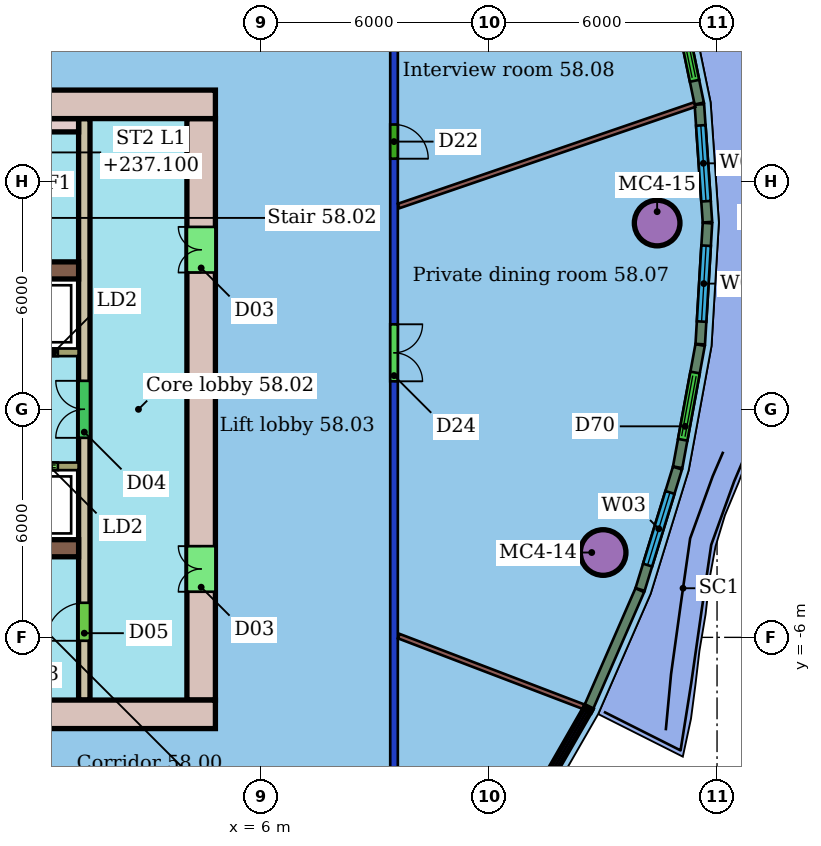
"""IFC4 building model, lengths in metres.
Left out: names, types, materials, properties, quantities, classifications, styles, units other than length and angle.
Written with IfcOpenShell. Run it as: python <this file> out.ifc"""

import sys

from ifc_helpers import new_model, si_unit, direction, frame, frame_2d, origin, origin_2d, place, context, subcontext, project, spatial, rectangle, hollow_circle, extrude, element, fill, save


model = new_model("IFC4")
c1 = context("Model", 3, precision=1e-05, world=origin(), true_north=direction((0.0, 1.0)))
c2 = subcontext(c1, "Body", "Model", "MODEL_VIEW")
j1 = project(units=[si_unit("LENGTHUNIT", "METRE"), si_unit("PLANEANGLEUNIT", "RADIAN")], contexts=[c1])
p1 = place(None, origin())
s1 = spatial("IfcSite", under=j1, at=p1, CompositionType="ELEMENT")
p2 = place(p1, origin())
s2 = spatial("IfcBuilding", under=s1, at=p2, CompositionType="ELEMENT")
p3 = place(p2, frame((0.0, 0.0, 235.3)))
s3 = spatial("IfcBuildingStorey", under=s2, at=p3, CompositionType="ELEMENT", Elevation=235.3)
for number, where, z_axis, x_axis in (
    (1, (15.003, -3.768, 0.0), (0.0, 0.0, 1.0), (1.0, 0.0, 0.0)),
    (2, (16.424, 4.901, 0.0), (0.0, 0.0, 1.0), (1.0, 0.0, 0.0)),
):
    element("IfcColumn", number, at=place(p3, frame(where, z_axis=z_axis, x_axis=x_axis)), inside=s3, PredefinedType="COLUMN", context=c2, shape_type="SweptSolid", body=[
        extrude(hollow_circle(Radius=0.6, WallThickness=0.045, at=origin_2d()), origin(), (0.0, 0.0, 1.0), 3.45),
    ])
p4 = place(p3, frame((9.5, 10.4, 0.0), z_axis=(0.0, 0.0, 1.0), x_axis=(0.0, -1.0, 0.0)))
e3 = element("IfcWall", 3, at=p4, inside=s3, PredefinedType="PARTITIONING", context=c2, shape_type="SweptSolid", body=[
    extrude(rectangle(XDim=20.8, YDim=0.2, at=frame_2d((10.4, 0.0))), origin(), (0.0, 0.0, 1.0), 3.05),
])
p5 = place(p4, frame((8.162, 0.0, 0.0)))
e4 = element("IfcOpeningElement", 4, at=p5, cuts=e3, PredefinedType="OPENING", context=c2, shape_type="SweptSolid", body=[
    extrude(rectangle(XDim=1.5, YDim=2.1, at=frame_2d((0.75, 1.05))), frame((0.0, 0.11, 0.0), z_axis=(0.0, -1.0, 0.0), x_axis=(1.0, 0.0, 0.0)), (0.0, 0.0, 1.0), 0.22),
])
p6 = place(p4, frame((2.906, 0.0, 0.0)))
e5 = element("IfcOpeningElement", 5, at=p6, cuts=e3, PredefinedType="OPENING", context=c2, shape_type="SweptSolid", body=[
    extrude(rectangle(XDim=0.9, YDim=2.1, at=frame_2d((0.45, 1.05))), frame((0.0, 0.11, 0.0), z_axis=(0.0, -1.0, 0.0), x_axis=(1.0, 0.0, 0.0)), (0.0, 0.0, 1.0), 0.22),
])
p7 = place(p3, frame((14.493, -7.826, 0.0), z_axis=(0.0, 0.0, 1.0), x_axis=(-0.934185469715, 0.356787763485, 0.0)))
e6 = element("IfcWall", 6, at=p7, inside=s3, PredefinedType="PARTITIONING", context=c2, shape_type="SweptSolid", body=[
    extrude(rectangle(XDim=5.213, YDim=0.125, at=frame_2d((2.607, 0.0))), origin(), (0.0, 0.0, 1.0), 3.45),
])
p8 = place(p3, frame((17.41, 8.018, 0.0), z_axis=(0.0, 0.0, 1.0), x_axis=(-0.94604778294, -0.32402714762, 0.0)))
e7 = element("IfcWall", 7, at=p8, inside=s3, PredefinedType="PARTITIONING", context=c2, shape_type="SweptSolid", body=[
    extrude(rectangle(XDim=8.234, YDim=0.125, at=frame_2d((4.117, 0.0))), origin(), (0.0, 0.0, 1.0), 3.45),
])
p9 = place(p3, frame((14.626, -7.832, 0.0), z_axis=(0.0, 0.0, 1.0), x_axis=(0.399940006996, 0.916541319747, 0.0)))
e8 = element("IfcWall", 8, at=p9, inside=s3, PredefinedType="SOLIDWALL", context=c2, shape_type="SweptSolid", body=[
    extrude(rectangle(XDim=3.353, YDim=0.25, at=frame_2d((1.676, 0.0))), origin(), (0.0, 0.0, 1.0), 3.1),
])
p10 = place(p3, frame((15.975, -4.739, 0.0), z_axis=(0.0, 0.0, 1.0), x_axis=(0.294306671234, 0.955711035443, 0.0)))
e9 = element("IfcWall", 9, at=p10, inside=s3, PredefinedType="SOLIDWALL", context=c2, shape_type="SweptSolid", body=[
    extrude(rectangle(XDim=3.341, YDim=0.25, at=frame_2d((1.67, 0.0))), origin(), (0.0, 0.0, 1.0), 3.1),
])
p11 = place(p10, frame((0.67, 0.0, 0.9)))
e10 = element("IfcOpeningElement", 10, at=p11, cuts=e9, PredefinedType="OPENING", context=c2, shape_type="SweptSolid", body=[
    extrude(rectangle(XDim=2.0, YDim=2.1, at=frame_2d((1.0, 1.05))), frame((0.0, 0.135, 0.0), z_axis=(0.0, -1.0, 0.0), x_axis=(1.0, 0.0, 0.0)), (0.0, 0.0, 1.0), 0.27),
])
p12 = place(p3, frame((16.964, -1.524, 0.0), z_axis=(0.0, 0.0, 1.0), x_axis=(0.180803315383, 0.983519273399, 0.0)))
e11 = element("IfcWall", 11, at=p12, inside=s3, PredefinedType="SOLIDWALL", context=c2, shape_type="SweptSolid", body=[
    extrude(rectangle(XDim=3.271, YDim=0.25, at=frame_2d((1.635, 0.0))), origin(), (0.0, 0.0, 1.0), 3.1),
])
p13 = place(p12, frame((0.735, 0.0, 0.0)))
e12 = element("IfcOpeningElement", 12, at=p13, cuts=e11, PredefinedType="OPENING", context=c2, shape_type="SweptSolid", body=[
    extrude(rectangle(XDim=1.8, YDim=2.4, at=frame_2d((0.9, 1.2))), frame((0.0, 0.135, 0.0), z_axis=(0.0, -1.0, 0.0), x_axis=(1.0, 0.0, 0.0)), (0.0, 0.0, 1.0), 0.27),
])
p14 = place(p3, frame((17.558, 1.716, 0.0), z_axis=(0.0, 0.0, 1.0), x_axis=(0.059610174745, 0.998221732416, 0.0)))
e13 = element("IfcWall", 13, at=p14, inside=s3, PredefinedType="SOLIDWALL", context=c2, shape_type="SweptSolid", body=[
    extrude(rectangle(XDim=3.19, YDim=0.25, at=frame_2d((1.595, 0.0))), origin(), (0.0, 0.0, 1.0), 3.1),
])
p15 = place(p14, frame((0.595, 0.0, 0.9)))
e14 = element("IfcOpeningElement", 14, at=p15, cuts=e13, PredefinedType="OPENING", context=c2, shape_type="SweptSolid", body=[
    extrude(rectangle(XDim=2.0, YDim=2.1, at=frame_2d((1.0, 1.05))), frame((0.0, 0.135, 0.0), z_axis=(0.0, -1.0, 0.0), x_axis=(1.0, 0.0, 0.0)), (0.0, 0.0, 1.0), 0.27),
])
p16 = place(p3, frame((17.748, 4.924, 0.0), z_axis=(0.0, 0.0, 1.0), x_axis=(-0.068637495047, 0.997641666268, 0.0)))
e15 = element("IfcWall", 15, at=p16, inside=s3, PredefinedType="SOLIDWALL", context=c2, shape_type="SweptSolid", body=[
    extrude(rectangle(XDim=3.105, YDim=0.25, at=frame_2d((1.553, 0.0))), origin(), (0.0, 0.0, 1.0), 3.1),
])
p17 = place(p16, frame((0.553, 0.0, 0.9)))
e16 = element("IfcOpeningElement", 16, at=p17, cuts=e15, PredefinedType="OPENING", context=c2, shape_type="SweptSolid", body=[
    extrude(rectangle(XDim=2.0, YDim=2.1, at=frame_2d((1.0, 1.05))), frame((0.0, 0.135, 0.0), z_axis=(0.0, -1.0, 0.0), x_axis=(1.0, 0.0, 0.0)), (0.0, 0.0, 1.0), 0.27),
])
p18 = place(p3, frame((17.531, 8.047, 0.0), z_axis=(0.0, 0.0, 1.0), x_axis=(-0.202546805283, 0.979272582925, 0.0)))
e17 = element("IfcWall", 17, at=p18, inside=s3, PredefinedType="SOLIDWALL", context=c2, shape_type="SweptSolid", body=[
    extrude(rectangle(XDim=3.021, YDim=0.25, at=frame_2d((1.51, 0.0))), origin(), (0.0, 0.0, 1.0), 3.1),
])
p19 = place(p18, frame((0.61, 0.0, 0.0)))
e18 = element("IfcOpeningElement", 18, at=p19, cuts=e17, PredefinedType="OPENING", context=c2, shape_type="SweptSolid", body=[
    extrude(rectangle(XDim=1.8, YDim=2.4, at=frame_2d((0.9, 1.2))), frame((0.0, 0.135, 0.0), z_axis=(0.0, -1.0, 0.0), x_axis=(1.0, 0.0, 0.0)), (0.0, 0.0, 1.0), 0.27),
])
p20 = place(p3, frame((4.8, 8.025, 0.0), z_axis=(0.0, 0.0, 1.0), x_axis=(-1.0, 0.0, 0.0)))
e19 = element("IfcWall", 19, at=p20, inside=s3, PredefinedType="SHEAR", context=c2, shape_type="SweptSolid", body=[
    extrude(rectangle(XDim=10.8, YDim=0.75, at=frame_2d((5.4, 0.0))), origin(), (0.0, 0.0, 1.0), 3.3),
])
p21 = place(p20, frame((4.4, 0.0, 0.0)))
e20 = element("IfcOpeningElement", 20, at=p21, cuts=e19, PredefinedType="OPENING", context=c2, shape_type="SweptSolid", body=[
    extrude(rectangle(XDim=1.2, YDim=2.1, at=frame_2d((0.6, 1.05))), frame((0.0, 0.385, 0.0), z_axis=(0.0, -1.0, 0.0), x_axis=(1.0, 0.0, 0.0)), (0.0, 0.0, 1.0), 0.77),
])
p22 = place(p3, frame((-16.8, -8.025, 0.0), z_axis=(0.0, 0.0, 1.0), x_axis=(1.0, 0.0, 0.0)))
e21 = element("IfcWall", 21, at=p22, inside=s3, PredefinedType="SHEAR", context=c2, shape_type="SweptSolid", body=[
    extrude(rectangle(XDim=21.6, YDim=0.75, at=frame_2d((10.8, 0.0))), origin(), (0.0, 0.0, 1.0), 3.3),
])
p23 = place(p22, frame((4.8, 0.0, 0.0)))
e22 = element("IfcOpeningElement", 22, at=p23, cuts=e21, PredefinedType="OPENING", context=c2, shape_type="SweptSolid", body=[
    extrude(rectangle(XDim=1.2, YDim=2.1, at=frame_2d((0.6, 1.05))), frame((0.0, 0.385, 0.0), z_axis=(0.0, -1.0, 0.0), x_axis=(1.0, 0.0, 0.0)), (0.0, 0.0, 1.0), 0.77),
])
p24 = place(p3, frame((4.425, -7.65, 0.0), z_axis=(0.0, 0.0, 1.0), x_axis=(0.0, 1.0, 0.0)))
e23 = element("IfcWall", 23, at=p24, inside=s3, PredefinedType="SHEAR", context=c2, shape_type="SweptSolid", body=[
    extrude(rectangle(XDim=15.3, YDim=0.75, at=frame_2d((7.65, 0.0))), origin(), (0.0, 0.0, 1.0), 3.3),
])
p25 = place(p24, frame((2.85, 0.0, 0.0)))
e24 = element("IfcOpeningElement", 24, at=p25, cuts=e23, PredefinedType="OPENING", context=c2, shape_type="SweptSolid", body=[
    extrude(rectangle(XDim=1.2, YDim=2.1, at=frame_2d((0.6, 1.05))), frame((0.0, 0.385, 0.0), z_axis=(0.0, -1.0, 0.0), x_axis=(1.0, 0.0, 0.0)), (0.0, 0.0, 1.0), 0.77),
])
p26 = place(p24, frame((11.25, 0.0, 0.0)))
e25 = element("IfcOpeningElement", 25, at=p26, cuts=e23, PredefinedType="OPENING", context=c2, shape_type="SweptSolid", body=[
    extrude(rectangle(XDim=1.2, YDim=2.1, at=frame_2d((0.6, 1.05))), frame((0.0, 0.385, 0.0), z_axis=(0.0, -1.0, 0.0), x_axis=(1.0, 0.0, 0.0)), (0.0, 0.0, 1.0), 0.77),
])
for number, where, z_axis, x_axis in (
    (26, (-6.0, 3.655, 0.0), (0.0, 0.0, 1.0), (1.0, 0.0, 0.0)),
    (27, (-6.0, -3.655, 0.0), (0.0, 0.0, 1.0), (1.0, 0.0, 0.0)),
):
    element("IfcWall", number, at=place(p3, frame(where, z_axis=z_axis, x_axis=x_axis)), inside=s3, PredefinedType="SHEAR", context=c2, shape_type="SweptSolid", body=[
        extrude(rectangle(XDim=7.2, YDim=0.45, at=frame_2d((3.6, 0.0))), origin(), (0.0, 0.0, 1.0), 3.3),
    ])
p27 = place(p3, frame((1.35, -7.65, 0.0), z_axis=(0.0, 0.0, 1.0), x_axis=(0.0, 1.0, 0.0)))
e28 = element("IfcWall", 28, at=p27, inside=s3, PredefinedType="SHEAR", context=c2, shape_type="SweptSolid", body=[
    extrude(rectangle(XDim=15.3, YDim=0.3, at=frame_2d((7.65, 0.0))), origin(), (0.0, 0.0, 1.0), 3.3),
])
p28 = place(p27, frame((1.56, 0.0, 0.0)))
e29 = element("IfcOpeningElement", 29, at=p28, cuts=e28, PredefinedType="OPENING", context=c2, shape_type="SweptSolid", body=[
    extrude(rectangle(XDim=1.0, YDim=2.1, at=frame_2d((0.5, 1.05))), frame((0.0, 0.16, 0.0), z_axis=(0.0, -1.0, 0.0), x_axis=(1.0, 0.0, 0.0)), (0.0, 0.0, 1.0), 0.32),
])
p29 = place(p27, frame((6.9, 0.0, 0.0)))
e30 = element("IfcOpeningElement", 30, at=p29, cuts=e28, PredefinedType="OPENING", context=c2, shape_type="SweptSolid", body=[
    extrude(rectangle(XDim=1.5, YDim=2.1, at=frame_2d((0.75, 1.05))), frame((0.0, 0.16, 0.0), z_axis=(0.0, -1.0, 0.0), x_axis=(1.0, 0.0, 0.0)), (0.0, 0.0, 1.0), 0.32),
])
p30 = place(p3, frame((-13.2, 1.5, 0.0), z_axis=(0.0, 0.0, 1.0), x_axis=(1.0, 0.0, 0.0)))
e31 = element("IfcWall", 31, at=p30, inside=s3, PredefinedType="SHEAR", context=c2, shape_type="SweptSolid", body=[
    extrude(rectangle(XDim=14.4, YDim=0.2, at=frame_2d((7.2, 0.0))), origin(), (0.0, 0.0, 1.0), 3.3),
])
p31 = place(p30, frame((10.312, 0.0, 0.0)))
e32 = element("IfcOpeningElement", 32, at=p31, cuts=e31, PredefinedType="OPENING", context=c2, shape_type="SweptSolid", body=[
    extrude(rectangle(XDim=1.1, YDim=2.1, at=frame_2d((0.55, 1.05))), frame((0.0, 0.11, 0.0), z_axis=(0.0, -1.0, 0.0), x_axis=(1.0, 0.0, 0.0)), (0.0, 0.0, 1.0), 0.22),
])
p32 = place(p30, frame((12.754, 0.0, 0.0)))
e33 = element("IfcOpeningElement", 33, at=p32, cuts=e31, PredefinedType="OPENING", context=c2, shape_type="SweptSolid", body=[
    extrude(rectangle(XDim=1.1, YDim=2.1, at=frame_2d((0.55, 1.05))), frame((0.0, 0.11, 0.0), z_axis=(0.0, -1.0, 0.0), x_axis=(1.0, 0.0, 0.0)), (0.0, 0.0, 1.0), 0.22),
])
p33 = place(p30, frame((0.15, 0.0, 0.0)))
e34 = element("IfcOpeningElement", 34, at=p33, cuts=e31, PredefinedType="OPENING", context=c2, shape_type="SweptSolid", body=[
    extrude(rectangle(XDim=0.9, YDim=2.1, at=frame_2d((0.45, 1.05))), frame((0.0, 0.11, 0.0), z_axis=(0.0, -1.0, 0.0), x_axis=(1.0, 0.0, 0.0)), (0.0, 0.0, 1.0), 0.22),
])
p34 = place(p30, frame((4.983, 0.0, 0.0)))
e35 = element("IfcOpeningElement", 35, at=p34, cuts=e31, PredefinedType="OPENING", context=c2, shape_type="SweptSolid", body=[
    extrude(rectangle(XDim=0.9, YDim=2.1, at=frame_2d((0.45, 1.05))), frame((0.0, 0.11, 0.0), z_axis=(0.0, -1.0, 0.0), x_axis=(1.0, 0.0, 0.0)), (0.0, 0.0, 1.0), 0.22),
])
p35 = place(p3, frame((1.2, -1.5, 0.0), z_axis=(0.0, 0.0, 1.0), x_axis=(-1.0, 0.0, 0.0)))
e36 = element("IfcWall", 36, at=p35, inside=s3, PredefinedType="SHEAR", context=c2, shape_type="SweptSolid", body=[
    extrude(rectangle(XDim=14.4, YDim=0.2, at=frame_2d((7.2, 0.0))), origin(), (0.0, 0.0, 1.0), 3.3),
])
p36 = place(p35, frame((7.821, 0.0, 0.0)))
e37 = element("IfcOpeningElement", 37, at=p36, cuts=e36, PredefinedType="OPENING", context=c2, shape_type="SweptSolid", body=[
    extrude(rectangle(XDim=1.2, YDim=2.1, at=frame_2d((0.6, 1.05))), frame((0.0, 0.11, 0.0), z_axis=(0.0, -1.0, 0.0), x_axis=(1.0, 0.0, 0.0)), (0.0, 0.0, 1.0), 0.22),
])
p37 = place(p35, frame((0.546, 0.0, 0.0)))
e38 = element("IfcOpeningElement", 38, at=p37, cuts=e36, PredefinedType="OPENING", context=c2, shape_type="SweptSolid", body=[
    extrude(rectangle(XDim=1.1, YDim=2.1, at=frame_2d((0.55, 1.05))), frame((0.0, 0.11, 0.0), z_axis=(0.0, -1.0, 0.0), x_axis=(1.0, 0.0, 0.0)), (0.0, 0.0, 1.0), 0.22),
])
p38 = place(p35, frame((4.335, 0.0, 0.0)))
e39 = element("IfcOpeningElement", 39, at=p38, cuts=e36, PredefinedType="OPENING", context=c2, shape_type="SweptSolid", body=[
    extrude(rectangle(XDim=1.0, YDim=2.1, at=frame_2d((0.5, 1.05))), frame((0.0, 0.11, 0.0), z_axis=(0.0, -1.0, 0.0), x_axis=(1.0, 0.0, 0.0)), (0.0, 0.0, 1.0), 0.22),
])
p39 = place(p35, frame((2.592, 0.0, 0.0)))
e40 = element("IfcOpeningElement", 40, at=p39, cuts=e36, PredefinedType="OPENING", context=c2, shape_type="SweptSolid", body=[
    extrude(rectangle(XDim=1.0, YDim=2.1, at=frame_2d((0.5, 1.05))), frame((0.0, 0.11, 0.0), z_axis=(0.0, -1.0, 0.0), x_axis=(1.0, 0.0, 0.0)), (0.0, 0.0, 1.0), 0.22),
])
p40 = place(p3, frame((0.4, 7.475, 0.0), z_axis=(0.0, 0.0, 1.0), x_axis=(1.0, 0.0, 0.0)))
e41 = element("IfcWall", 41, at=p40, inside=s3, PredefinedType="SHEAR", context=c2, shape_type="SweptSolid", body=[
    extrude(rectangle(XDim=0.8, YDim=0.35, at=frame_2d((0.4, 0.0))), origin(), (0.0, 0.0, 1.0), 3.3),
])
p41 = place(p5, origin())
e42 = element("IfcDoor", 42, at=p41, inside=s3, OperationType="DOUBLE_DOOR_SINGLE_SWING", PredefinedType="DOOR", context=c2, shape_type="SweptSolid", body=[
    extrude(rectangle(XDim=1.5, YDim=2.1, at=frame_2d((0.75, 1.05))), frame((0.0, 0.025, 0.0), z_axis=(0.0, -1.0, 0.0), x_axis=(1.0, 0.0, 0.0)), (0.0, 0.0, 1.0), 0.05),
])
fill(e4, e42)
p42 = place(p6, origin())
e43 = element("IfcDoor", 43, at=p42, inside=s3, OperationType="SINGLE_SWING_RIGHT", PredefinedType="DOOR", context=c2, shape_type="SweptSolid", body=[
    extrude(rectangle(XDim=0.9, YDim=2.1, at=frame_2d((0.45, 1.05))), frame((0.0, 0.025, 0.0), z_axis=(0.0, -1.0, 0.0), x_axis=(1.0, 0.0, 0.0)), (0.0, 0.0, 1.0), 0.05),
])
fill(e5, e43)
p43 = place(p11, origin())
e44 = element("IfcWindow", 44, at=p43, inside=s3, PartitioningType="SINGLE_PANEL", PredefinedType="WINDOW", context=c2, shape_type="SweptSolid", body=[
    extrude(rectangle(XDim=2.0, YDim=2.1, at=frame_2d((1.0, 1.05))), frame((0.0, 0.03, 0.0), z_axis=(0.0, -1.0, 0.0), x_axis=(1.0, 0.0, 0.0)), (0.0, 0.0, 1.0), 0.06),
])
fill(e10, e44)
p44 = place(p13, origin())
e45 = element("IfcDoor", 45, at=p44, inside=s3, OperationType="DOUBLE_DOOR_SLIDING", PredefinedType="DOOR", context=c2, shape_type="SweptSolid", body=[
    extrude(rectangle(XDim=1.8, YDim=2.4, at=frame_2d((0.9, 1.2))), frame((0.0, 0.025, 0.0), z_axis=(0.0, -1.0, 0.0), x_axis=(1.0, 0.0, 0.0)), (0.0, 0.0, 1.0), 0.05),
])
fill(e12, e45)
p45 = place(p15, origin())
e46 = element("IfcWindow", 46, at=p45, inside=s3, PartitioningType="SINGLE_PANEL", PredefinedType="WINDOW", context=c2, shape_type="SweptSolid", body=[
    extrude(rectangle(XDim=2.0, YDim=2.1, at=frame_2d((1.0, 1.05))), frame((0.0, 0.03, 0.0), z_axis=(0.0, -1.0, 0.0), x_axis=(1.0, 0.0, 0.0)), (0.0, 0.0, 1.0), 0.06),
])
fill(e14, e46)
p46 = place(p17, origin())
e47 = element("IfcWindow", 47, at=p46, inside=s3, PartitioningType="SINGLE_PANEL", PredefinedType="WINDOW", context=c2, shape_type="SweptSolid", body=[
    extrude(rectangle(XDim=2.0, YDim=2.1, at=frame_2d((1.0, 1.05))), frame((0.0, 0.03, 0.0), z_axis=(0.0, -1.0, 0.0), x_axis=(1.0, 0.0, 0.0)), (0.0, 0.0, 1.0), 0.06),
])
fill(e16, e47)
p47 = place(p19, origin())
e48 = element("IfcDoor", 48, at=p47, inside=s3, OperationType="DOUBLE_DOOR_SLIDING", PredefinedType="DOOR", context=c2, shape_type="SweptSolid", body=[
    extrude(rectangle(XDim=1.8, YDim=2.4, at=frame_2d((0.9, 1.2))), frame((0.0, 0.025, 0.0), z_axis=(0.0, -1.0, 0.0), x_axis=(1.0, 0.0, 0.0)), (0.0, 0.0, 1.0), 0.05),
])
fill(e18, e48)
p48 = place(p25, origin())
e49 = element("IfcDoor", 49, at=p48, inside=s3, OperationType="DOUBLE_DOOR_SINGLE_SWING", PredefinedType="NOTDEFINED", context=c2, shape_type="SweptSolid", body=[
    extrude(rectangle(XDim=1.2, YDim=2.1, at=frame_2d((0.6, 1.05))), frame((0.0, 0.025, 0.0), z_axis=(0.0, -1.0, 0.0), x_axis=(1.0, 0.0, 0.0)), (0.0, 0.0, 1.0), 0.05),
])
fill(e24, e49)
p49 = place(p26, origin())
e50 = element("IfcDoor", 50, at=p49, inside=s3, OperationType="DOUBLE_DOOR_SINGLE_SWING", PredefinedType="NOTDEFINED", context=c2, shape_type="SweptSolid", body=[
    extrude(rectangle(XDim=1.2, YDim=2.1, at=frame_2d((0.6, 1.05))), frame((0.0, 0.025, 0.0), z_axis=(0.0, -1.0, 0.0), x_axis=(1.0, 0.0, 0.0)), (0.0, 0.0, 1.0), 0.05),
])
fill(e25, e50)
p50 = place(p28, origin())
e51 = element("IfcDoor", 51, at=p50, inside=s3, OperationType="SINGLE_SWING_LEFT", PredefinedType="NOTDEFINED", context=c2, shape_type="SweptSolid", body=[
    extrude(rectangle(XDim=1.0, YDim=2.1, at=frame_2d((0.5, 1.05))), frame((0.0, 0.025, 0.0), z_axis=(0.0, -1.0, 0.0), x_axis=(1.0, 0.0, 0.0)), (0.0, 0.0, 1.0), 0.05),
])
fill(e29, e51)
p51 = place(p29, origin())
e52 = element("IfcDoor", 52, at=p51, inside=s3, OperationType="DOUBLE_DOOR_SINGLE_SWING", PredefinedType="NOTDEFINED", context=c2, shape_type="SweptSolid", body=[
    extrude(rectangle(XDim=1.5, YDim=2.1, at=frame_2d((0.75, 1.05))), frame((0.0, 0.025, 0.0), z_axis=(0.0, -1.0, 0.0), x_axis=(1.0, 0.0, 0.0)), (0.0, 0.0, 1.0), 0.05),
])
fill(e30, e52)
p52 = place(p32, origin())
e53 = element("IfcDoor", 53, at=p52, inside=s3, OperationType="DOUBLE_DOOR_SLIDING", PredefinedType="NOTDEFINED", context=c2, shape_type="SweptSolid", body=[
    extrude(rectangle(XDim=1.1, YDim=2.1, at=frame_2d((0.55, 1.05))), frame((0.0, 0.025, 0.0), z_axis=(0.0, -1.0, 0.0), x_axis=(1.0, 0.0, 0.0)), (0.0, 0.0, 1.0), 0.05),
])
fill(e33, e53)
p53 = place(p37, origin())
e54 = element("IfcDoor", 54, at=p53, inside=s3, OperationType="DOUBLE_DOOR_SLIDING", PredefinedType="NOTDEFINED", context=c2, shape_type="SweptSolid", body=[
    extrude(rectangle(XDim=1.1, YDim=2.1, at=frame_2d((0.55, 1.05))), frame((0.0, 0.025, 0.0), z_axis=(0.0, -1.0, 0.0), x_axis=(1.0, 0.0, 0.0)), (0.0, 0.0, 1.0), 0.05),
])
fill(e38, e54)
save(model, sys.argv[1])
